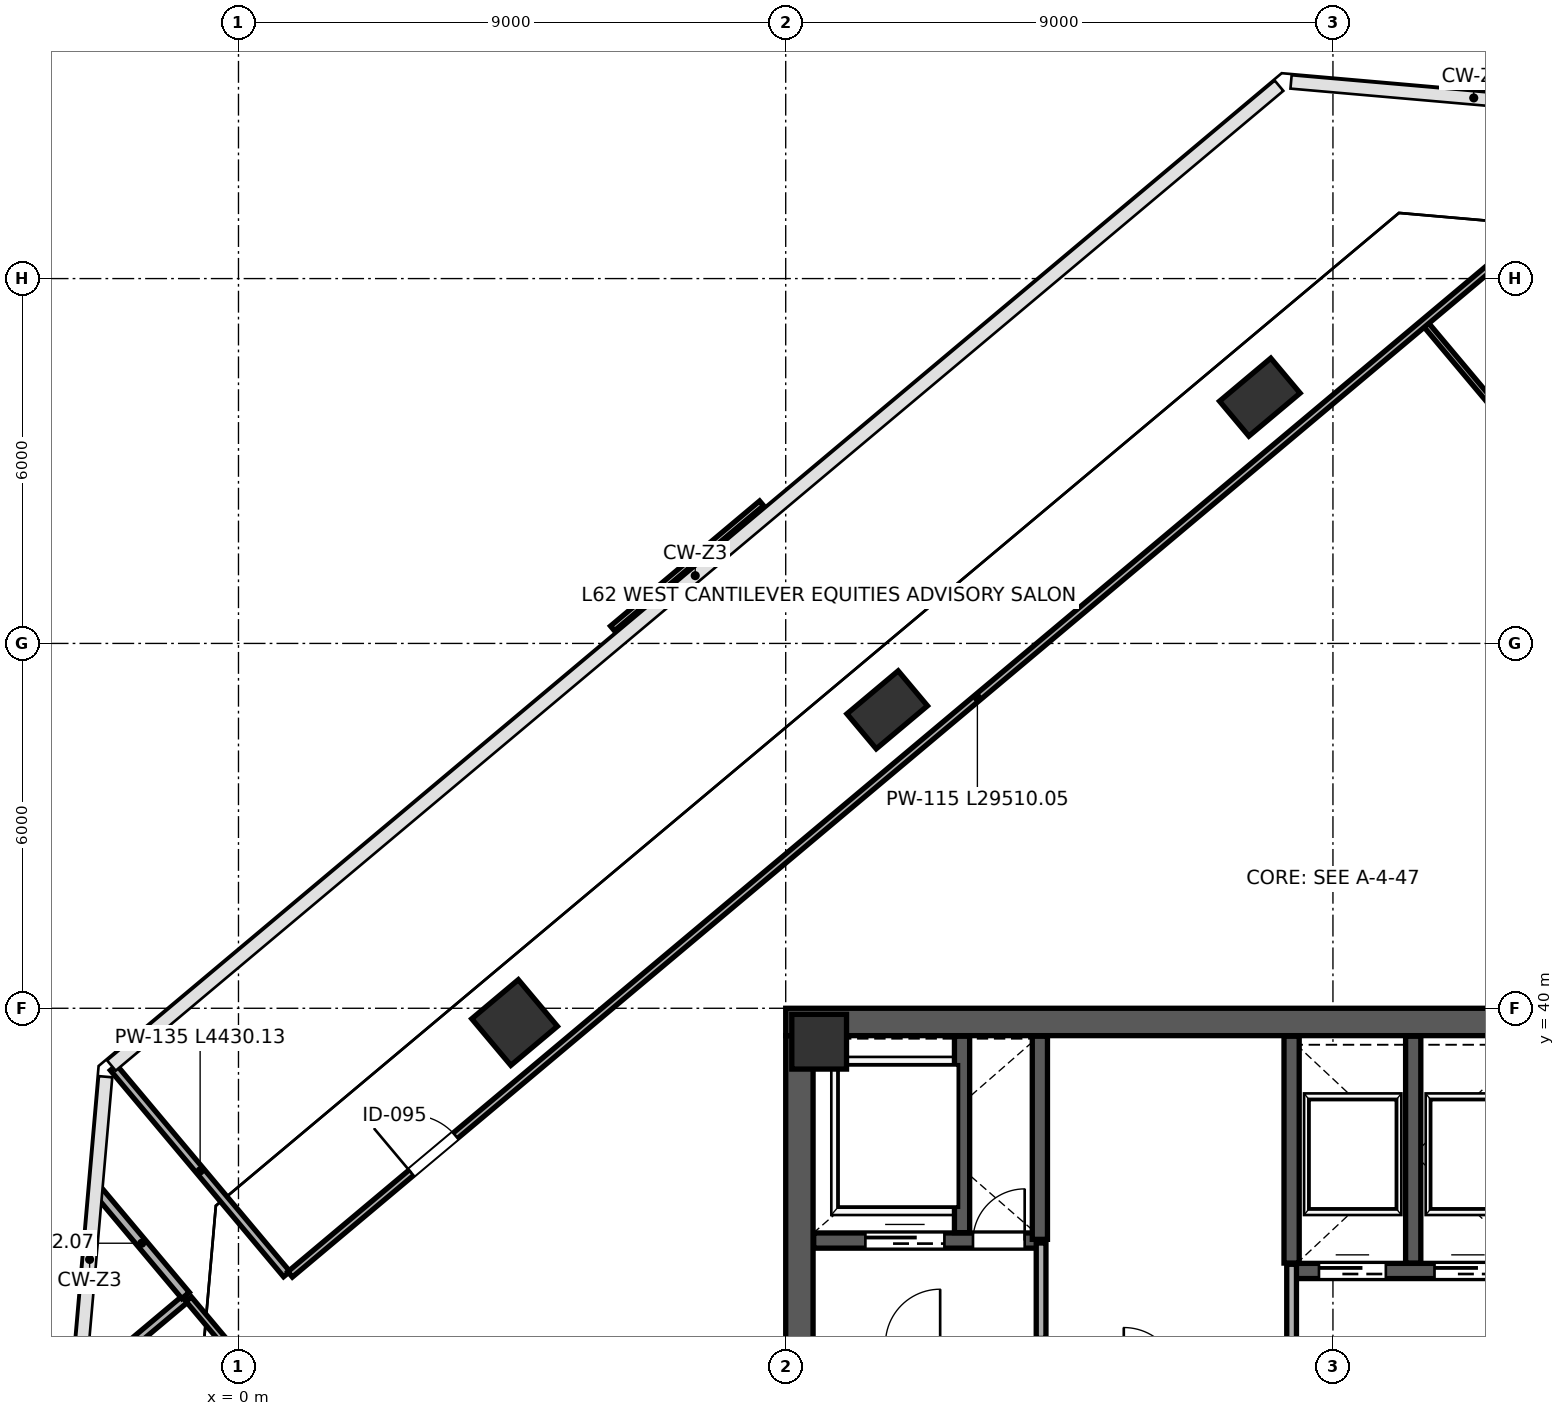
"""IFC4 building model, lengths in metres.
Left out: names, types, materials, properties, quantities, classifications, styles, units other than length and angle.
Written with IfcOpenShell. Run it as: python <this file> out.ifc"""

import sys

from ifc_helpers import new_model, si_unit, direction, frame, frame_2d, origin, origin_2d, place, context, subcontext, project, spatial, rectangle, extrude, clip, halfspace, source, transform, mapped, element, fill, save


model = new_model("IFC4")
c1 = context("Model", 3, precision=1e-05, world=origin(), true_north=direction((0.0, 1.0)))
c2 = subcontext(c1, "Body", "Model", "MODEL_VIEW")
j1 = project(units=[si_unit("LENGTHUNIT", "METRE"), si_unit("PLANEANGLEUNIT", "RADIAN")], contexts=[c1])
p1 = place(None, origin())
s1 = spatial("IfcSite", under=j1, at=p1, CompositionType="ELEMENT")
p2 = place(p1, origin())
s2 = spatial("IfcBuilding", under=s1, at=p2, CompositionType="ELEMENT")
p3 = place(p2, frame((0.0, 0.0, 275.2)))
s3 = spatial("IfcBuildingStorey", under=s2, at=p3, CompositionType="ELEMENT", Elevation=275.2)
m1 = source(origin(), c2, "Body", "SweptSolid", [
    extrude(rectangle(XDim=0.9, YDim=0.9, at=origin_2d()), origin(), (0.0, 0.0, 1.0), 4.198),
])
p4 = place(p3, frame((9.55, 39.45, 0.001), z_axis=(0.0, 0.0, 1.0), x_axis=(1.0, 0.0, 0.0)))
e1 = element("IfcColumn", 1, at=p4, inside=s3, PredefinedType="COLUMN", context=c2, shape_type="MappedRepresentation", body=[
    mapped(m1, transform((0.0, 0.0, 0.0), scale=1.0)),
])
p5 = place(p3, frame((4.541, 39.765, 0.0), z_axis=(0.082919741406, 0.171203870763, 0.981740062909), x_axis=(0.250686307476, -0.957037771121, 0.145722612835)))
e2 = element("IfcColumn", 2, at=p5, inside=s3, PredefinedType="COLUMN", context=c2, shape_type="Clipping", body=[
    clip(clip(extrude(rectangle(XDim=1.0, YDim=1.0, at=origin_2d()), origin(), (0.0, 0.0, 1.0), 4.278), halfspace(frame((0.0, 0.0, 0.137), z_axis=(0.0, 0.0, -1.0), x_axis=(1.0, 0.0, 0.0)), False)), halfspace(frame((0.0, 0.0, 4.141), z_axis=(0.0, 0.0, 1.0), x_axis=(1.0, 0.0, 0.0)), False)),
])
p6 = place(p3, frame((10.669, 44.908, 0.0), z_axis=(0.134500210061, 0.107932267333, 0.985017928345), x_axis=(-0.186208166416, -0.973588495027, 0.132105870839)))
e3 = element("IfcColumn", 3, at=p6, inside=s3, PredefinedType="PILASTER", context=c2, shape_type="Clipping", body=[
    clip(clip(extrude(rectangle(XDim=0.75, YDim=1.1, at=origin_2d()), origin(), (0.0, 0.0, 1.0), 4.264), halfspace(frame((0.0, 0.0, 0.113), z_axis=(0.0, 0.0, -1.0), x_axis=(1.0, 0.0, 0.0)), False)), halfspace(frame((0.0, 0.0, 4.151), z_axis=(0.0, 0.0, 1.0), x_axis=(1.0, 0.0, 0.0)), False)),
])
p7 = place(p3, frame((16.797, 50.05, 0.0), z_axis=(0.185071764016, 0.043942416988, 0.981742077204), x_axis=(-0.583223851967, -0.799135269847, 0.145714649172)))
e4 = element("IfcColumn", 4, at=p7, inside=s3, PredefinedType="PILASTER", context=c2, shape_type="Clipping", body=[
    clip(clip(extrude(rectangle(XDim=0.75, YDim=1.1, at=origin_2d()), origin(), (0.0, 0.0, 1.0), 4.278), halfspace(frame((0.0, 0.0, 0.125), z_axis=(0.0, 0.0, -1.0), x_axis=(1.0, 0.0, 0.0)), False)), halfspace(frame((0.0, 0.0, 4.153), z_axis=(0.0, 0.0, 1.0), x_axis=(1.0, 0.0, 0.0)), False)),
])
p8 = place(p3, frame((9.225, 24.45, 0.0), z_axis=(0.0, 0.0, 1.0), x_axis=(0.0, 1.0, 0.0)))
e5 = element("IfcWall", 5, at=p8, inside=s3, PredefinedType="SHEAR", context=c2, shape_type="SweptSolid", body=[
    extrude(rectangle(XDim=15.1, YDim=0.45, at=frame_2d((7.55, 0.0))), origin(), (0.0, 0.0, 1.0), 3.96),
])
p9 = place(p8, frame((8.7, 0.0, 0.0)))
e6 = element("IfcOpeningElement", 6, at=p9, cuts=e5, PredefinedType="OPENING", context=c2, shape_type="SweptSolid", body=[
    extrude(rectangle(XDim=1.15, YDim=2.2, at=frame_2d((0.575, 1.1))), frame((0.0, 0.235, 0.0), z_axis=(0.0, -1.0, 0.0), x_axis=(1.0, 0.0, 0.0)), (0.0, 0.0, 1.0), 0.47),
])
p10 = place(p3, frame((9.0, 39.775, 0.0), z_axis=(0.0, 0.0, 1.0), x_axis=(1.0, 0.0, 0.0)))
e7 = element("IfcWall", 7, at=p10, inside=s3, PredefinedType="SHEAR", context=c2, shape_type="SweptSolid", body=[
    extrude(rectangle(XDim=18.0, YDim=0.45, at=frame_2d((9.0, 0.0))), origin(), (0.0, 0.0, 1.0), 3.96),
])
p11 = place(p3, frame((9.46, 36.18, 0.0), z_axis=(0.0, 0.0, 1.0), x_axis=(1.0, 0.0, 0.0)))
e8 = element("IfcWall", 8, at=p11, inside=s3, PredefinedType="SHEAR", context=c2, shape_type="SweptSolid", body=[
    extrude(rectangle(XDim=3.79, YDim=0.25, at=frame_2d((1.895, 0.0))), origin(), (0.0, 0.0, 1.0), 3.96),
])
p12 = place(p11, frame((2.62, 0.0, 0.0)))
e9 = element("IfcOpeningElement", 9, at=p12, cuts=e8, PredefinedType="OPENING", context=c2, shape_type="SweptSolid", body=[
    extrude(rectangle(XDim=0.85, YDim=2.1, at=frame_2d((0.425, 1.05))), frame((0.0, 0.135, 0.0), z_axis=(0.0, -1.0, 0.0), x_axis=(1.0, 0.0, 0.0)), (0.0, 0.0, 1.0), 0.27),
])
p13 = place(p11, frame((0.85, 0.0, 0.0)))
e10 = element("IfcOpeningElement", 10, at=p13, cuts=e8, PredefinedType="OPENING", context=c2, shape_type="SweptSolid", body=[
    extrude(rectangle(XDim=1.3, YDim=2.25, at=frame_2d((0.65, 1.125))), frame((0.0, 0.135, 0.0), z_axis=(0.0, -1.0, 0.0), x_axis=(1.0, 0.0, 0.0)), (0.0, 0.0, 1.0), 0.27),
])
p14 = place(p3, frame((11.9, 36.31, 0.0), z_axis=(0.0, 0.0, 1.0), x_axis=(0.0, 1.0, 0.0)))
e11 = element("IfcWall", 11, at=p14, inside=s3, PredefinedType="SHEAR", context=c2, shape_type="SweptSolid", body=[
    extrude(rectangle(XDim=3.23, YDim=0.25, at=frame_2d((1.615, 0.0))), origin(), (0.0, 0.0, 1.0), 3.96),
])
p15 = place(p3, frame((13.18, 36.2, 0.0), z_axis=(0.0, 0.0, 1.0), x_axis=(0.0, 1.0, 0.0)))
e12 = element("IfcWall", 12, at=p15, inside=s3, PredefinedType="SHEAR", context=c2, shape_type="SweptSolid", body=[
    extrude(rectangle(XDim=3.34, YDim=0.25, at=frame_2d((1.67, 0.0))), origin(), (0.0, 0.0, 1.0), 3.96),
])
p16 = place(p3, frame((17.32, 35.68, 0.0), z_axis=(0.0, 0.0, 1.0), x_axis=(1.0, 0.0, 0.0)))
e13 = element("IfcWall", 13, at=p16, inside=s3, PredefinedType="SHEAR", context=c2, shape_type="SweptSolid", body=[
    extrude(rectangle(XDim=3.87, YDim=0.25, at=frame_2d((1.935, 0.0))), origin(), (0.0, 0.0, 1.0), 3.96),
])
p17 = place(p16, frame((0.45, 0.0, 0.0)))
e14 = element("IfcOpeningElement", 14, at=p17, cuts=e13, PredefinedType="OPENING", context=c2, shape_type="SweptSolid", body=[
    extrude(rectangle(XDim=1.1, YDim=2.2, at=frame_2d((0.55, 1.1))), frame((0.0, 0.135, 0.0), z_axis=(0.0, -1.0, 0.0), x_axis=(1.0, 0.0, 0.0)), (0.0, 0.0, 1.0), 0.27),
])
p18 = place(p16, frame((2.35, 0.0, 0.0)))
e15 = element("IfcOpeningElement", 15, at=p18, cuts=e13, PredefinedType="OPENING", context=c2, shape_type="SweptSolid", body=[
    extrude(rectangle(XDim=1.1, YDim=2.2, at=frame_2d((0.55, 1.1))), frame((0.0, 0.135, 0.0), z_axis=(0.0, -1.0, 0.0), x_axis=(1.0, 0.0, 0.0)), (0.0, 0.0, 1.0), 0.27),
])
for number, where, z_axis, x_axis in (
    (16, (17.32, 35.81, 0.0), (0.0, 0.0, 1.0), (0.0, 1.0, 0.0)),
    (17, (19.32, 35.81, 0.0), (0.0, 0.0, 1.0), (0.0, 1.0, 0.0)),
):
    element("IfcWall", number, at=place(p3, frame(where, z_axis=z_axis, x_axis=x_axis)), inside=s3, PredefinedType="SHEAR", context=c2, shape_type="SweptSolid", body=[
        extrude(rectangle(XDim=3.73, YDim=0.25, at=frame_2d((1.865, 0.0))), origin(), (0.0, 0.0, 1.0), 3.96),
    ])
p19 = place(p3, frame((13.2, 34.57, 0.0), z_axis=(0.0, 0.0, 1.0), x_axis=(0.0, 1.0, 0.0)))
e18 = element("IfcWall", 18, at=p19, inside=s3, PredefinedType="PARTITIONING", context=c2, shape_type="SweptSolid", body=[
    extrude(rectangle(XDim=1.57, YDim=0.16, at=frame_2d((0.785, 0.0))), origin(), (0.0, 0.0, 1.0), 3.96),
])
p20 = place(p3, frame((17.32, 33.86, 0.0), z_axis=(0.0, 0.0, 1.0), x_axis=(0.0, 1.0, 0.0)))
e19 = element("IfcWall", 19, at=p20, inside=s3, PredefinedType="PARTITIONING", context=c2, shape_type="SweptSolid", body=[
    extrude(rectangle(XDim=1.93, YDim=0.16, at=frame_2d((0.965, 0.0))), origin(), (0.0, 0.0, 1.0), 3.96),
])
p21 = place(p3, frame((-2.593, 33.78, 0.0), z_axis=(0.0, 0.0, 1.0), x_axis=(0.765994359698, 0.642847292062, 0.0)))
e20 = element("IfcWall", 20, at=p21, inside=s3, PredefinedType="PARTITIONING", context=c2, shape_type="SweptSolid", body=[
    extrude(rectangle(XDim=2.242, YDim=0.135, at=frame_2d((1.121, 0.0))), origin(), (0.0, 0.0, 1.0), 3.96),
])
p22 = place(p3, frame((-2.312, 36.995, 0.0), z_axis=(0.0, 0.0, 1.0), x_axis=(0.642783398336, -0.766047976842, 0.0)))
e21 = element("IfcWall", 21, at=p22, inside=s3, PredefinedType="PARTITIONING", context=c2, shape_type="SweptSolid", body=[
    extrude(rectangle(XDim=2.242, YDim=0.16, at=frame_2d((1.121, 0.0))), origin(), (0.0, 0.0, 1.0), 3.96),
])
p23 = place(p3, frame((-0.819, 35.216, 0.0), z_axis=(0.0, 0.0, 1.0), x_axis=(0.642772999209, -0.766056702528, 0.0)))
e22 = element("IfcWall", 22, at=p23, inside=s3, PredefinedType="PARTITIONING", context=c2, shape_type="SweptSolid", body=[
    extrude(rectangle(XDim=7.42, YDim=0.115, at=frame_2d((3.71, 0.0))), origin(), (0.0, 0.0, 1.0), 3.96),
])
p24 = place(p23, frame((1.7, 0.0, 0.0)))
e23 = element("IfcOpeningElement", 23, at=p24, cuts=e22, PredefinedType="OPENING", context=c2, shape_type="SweptSolid", body=[
    extrude(rectangle(XDim=0.9, YDim=2.15, at=frame_2d((0.45, 1.075))), frame((0.0, 0.067, 0.0), z_axis=(0.0, -1.0, 0.0), x_axis=(1.0, 0.0, 0.0)), (0.0, 0.0, 1.0), 0.135),
])
p25 = place(p23, frame((5.0, 0.0, 0.0)))
e24 = element("IfcOpeningElement", 24, at=p25, cuts=e22, PredefinedType="OPENING", context=c2, shape_type="SweptSolid", body=[
    extrude(rectangle(XDim=0.95, YDim=2.15, at=frame_2d((0.475, 1.075))), frame((0.0, 0.067, 0.0), z_axis=(0.0, -1.0, 0.0), x_axis=(1.0, 0.0, 0.0)), (0.0, 0.0, 1.0), 0.135),
])
p26 = place(p3, frame((19.528, 51.245, 0.0), z_axis=(0.0, 0.0, 1.0), x_axis=(0.642782364439, -0.766048844374, 0.0)))
e25 = element("IfcWall", 25, at=p26, inside=s3, PredefinedType="PARTITIONING", context=c2, shape_type="SweptSolid", body=[
    extrude(rectangle(XDim=27.34, YDim=0.1, at=frame_2d((13.67, 0.0))), origin(), (0.0, 0.0, 1.0), 3.96),
])
p27 = place(p26, frame((10.8, 0.0, 0.0)))
e26 = element("IfcOpeningElement", 26, at=p27, cuts=e25, PredefinedType="OPENING", context=c2, shape_type="SweptSolid", body=[
    extrude(rectangle(XDim=0.95, YDim=2.15, at=frame_2d((0.475, 1.075))), frame((0.0, 0.06, 0.0), z_axis=(0.0, -1.0, 0.0), x_axis=(1.0, 0.0, 0.0)), (0.0, 0.0, 1.0), 0.12),
])
p28 = place(p3, frame((-2.055, 39.022, 0.0), z_axis=(0.0, 0.0, 1.0), x_axis=(0.642777132802, -0.766053234147, 0.0)))
e27 = element("IfcWall", 27, at=p28, inside=s3, PredefinedType="PARTITIONING", context=c2, shape_type="SweptSolid", body=[
    extrude(rectangle(XDim=4.43, YDim=0.135, at=frame_2d((2.215, 0.0))), origin(), (0.0, 0.0, 1.0), 3.96),
])
p29 = place(p3, frame((0.849, 35.624, 0.0), z_axis=(0.0, 0.0, 1.0), x_axis=(0.766042777978, 0.642789594119, 0.0)))
e28 = element("IfcWall", 28, at=p29, inside=s3, PredefinedType="PARTITIONING", context=c2, shape_type="SweptSolid", body=[
    extrude(rectangle(XDim=29.51, YDim=0.115, at=frame_2d((14.755, 0.0))), origin(), (0.0, 0.0, 1.0), 3.96),
])
p30 = place(p29, frame((2.6, 0.0, 0.0)))
e29 = element("IfcOpeningElement", 29, at=p30, cuts=e28, PredefinedType="OPENING", context=c2, shape_type="SweptSolid", body=[
    extrude(rectangle(XDim=0.95, YDim=2.15, at=frame_2d((0.475, 1.075))), frame((0.0, 0.067, 0.0), z_axis=(0.0, -1.0, 0.0), x_axis=(1.0, 0.0, 0.0)), (0.0, 0.0, 1.0), 0.135),
])
m2 = source(origin(), c2, "Body", "SweptSolid", [
    extrude(rectangle(XDim=0.85, YDim=2.1, at=frame_2d((0.425, 1.05))), frame((0.0, 0.025, 0.0), z_axis=(0.0, -1.0, 0.0), x_axis=(1.0, 0.0, 0.0)), (0.0, 0.0, 1.0), 0.05),
])
p31 = place(p12, origin())
e30 = element("IfcDoor", 30, at=p31, inside=s3, OperationType="SINGLE_SWING_RIGHT", PredefinedType="DOOR", context=c2, shape_type="MappedRepresentation", body=[
    mapped(m2, transform((0.0, 0.0, 0.0), scale=1.0)),
])
fill(e9, e30)
m3 = source(origin(), c2, "Body", "SweptSolid", [
    extrude(rectangle(XDim=1.1, YDim=2.2, at=frame_2d((0.55, 1.1))), frame((0.0, 0.025, 0.0), z_axis=(0.0, -1.0, 0.0), x_axis=(1.0, 0.0, 0.0)), (0.0, 0.0, 1.0), 0.05),
])
p32 = place(p17, origin())
e31 = element("IfcDoor", 31, at=p32, inside=s3, OperationType="SLIDING_TO_LEFT", PredefinedType="DOOR", context=c2, shape_type="MappedRepresentation", body=[
    mapped(m3, transform((0.0, 0.0, 0.0), scale=1.0)),
])
fill(e14, e31)
p33 = place(p18, origin())
e32 = element("IfcDoor", 32, at=p33, inside=s3, OperationType="SLIDING_TO_RIGHT", PredefinedType="DOOR", context=c2, shape_type="MappedRepresentation", body=[
    mapped(m3, transform((0.0, 0.0, 0.0), scale=1.0)),
])
fill(e15, e32)
m4 = source(origin(), c2, "Body", "SweptSolid", [
    extrude(rectangle(XDim=1.3, YDim=2.25, at=frame_2d((0.65, 1.125))), frame((0.0, 0.025, 0.0), z_axis=(0.0, -1.0, 0.0), x_axis=(1.0, 0.0, 0.0)), (0.0, 0.0, 1.0), 0.05),
])
p34 = place(p13, origin())
e33 = element("IfcDoor", 33, at=p34, inside=s3, OperationType="SLIDING_TO_LEFT", PredefinedType="DOOR", context=c2, shape_type="MappedRepresentation", body=[
    mapped(m4, transform((0.0, 0.0, 0.0), scale=1.0)),
])
fill(e10, e33)
m5 = source(origin(), c2, "Body", "SweptSolid", [
    extrude(rectangle(XDim=0.95, YDim=2.15, at=frame_2d((0.475, 1.075))), frame((0.0, 0.025, 0.0), z_axis=(0.0, -1.0, 0.0), x_axis=(1.0, 0.0, 0.0)), (0.0, 0.0, 1.0), 0.05),
])
p35 = place(p30, origin())
e34 = element("IfcDoor", 34, at=p35, inside=s3, OperationType="SINGLE_SWING_LEFT", PredefinedType="DOOR", context=c2, shape_type="MappedRepresentation", body=[
    mapped(m5, transform((0.0, 0.0, 0.0), scale=1.0)),
])
fill(e29, e34)
save(model, sys.argv[1])
